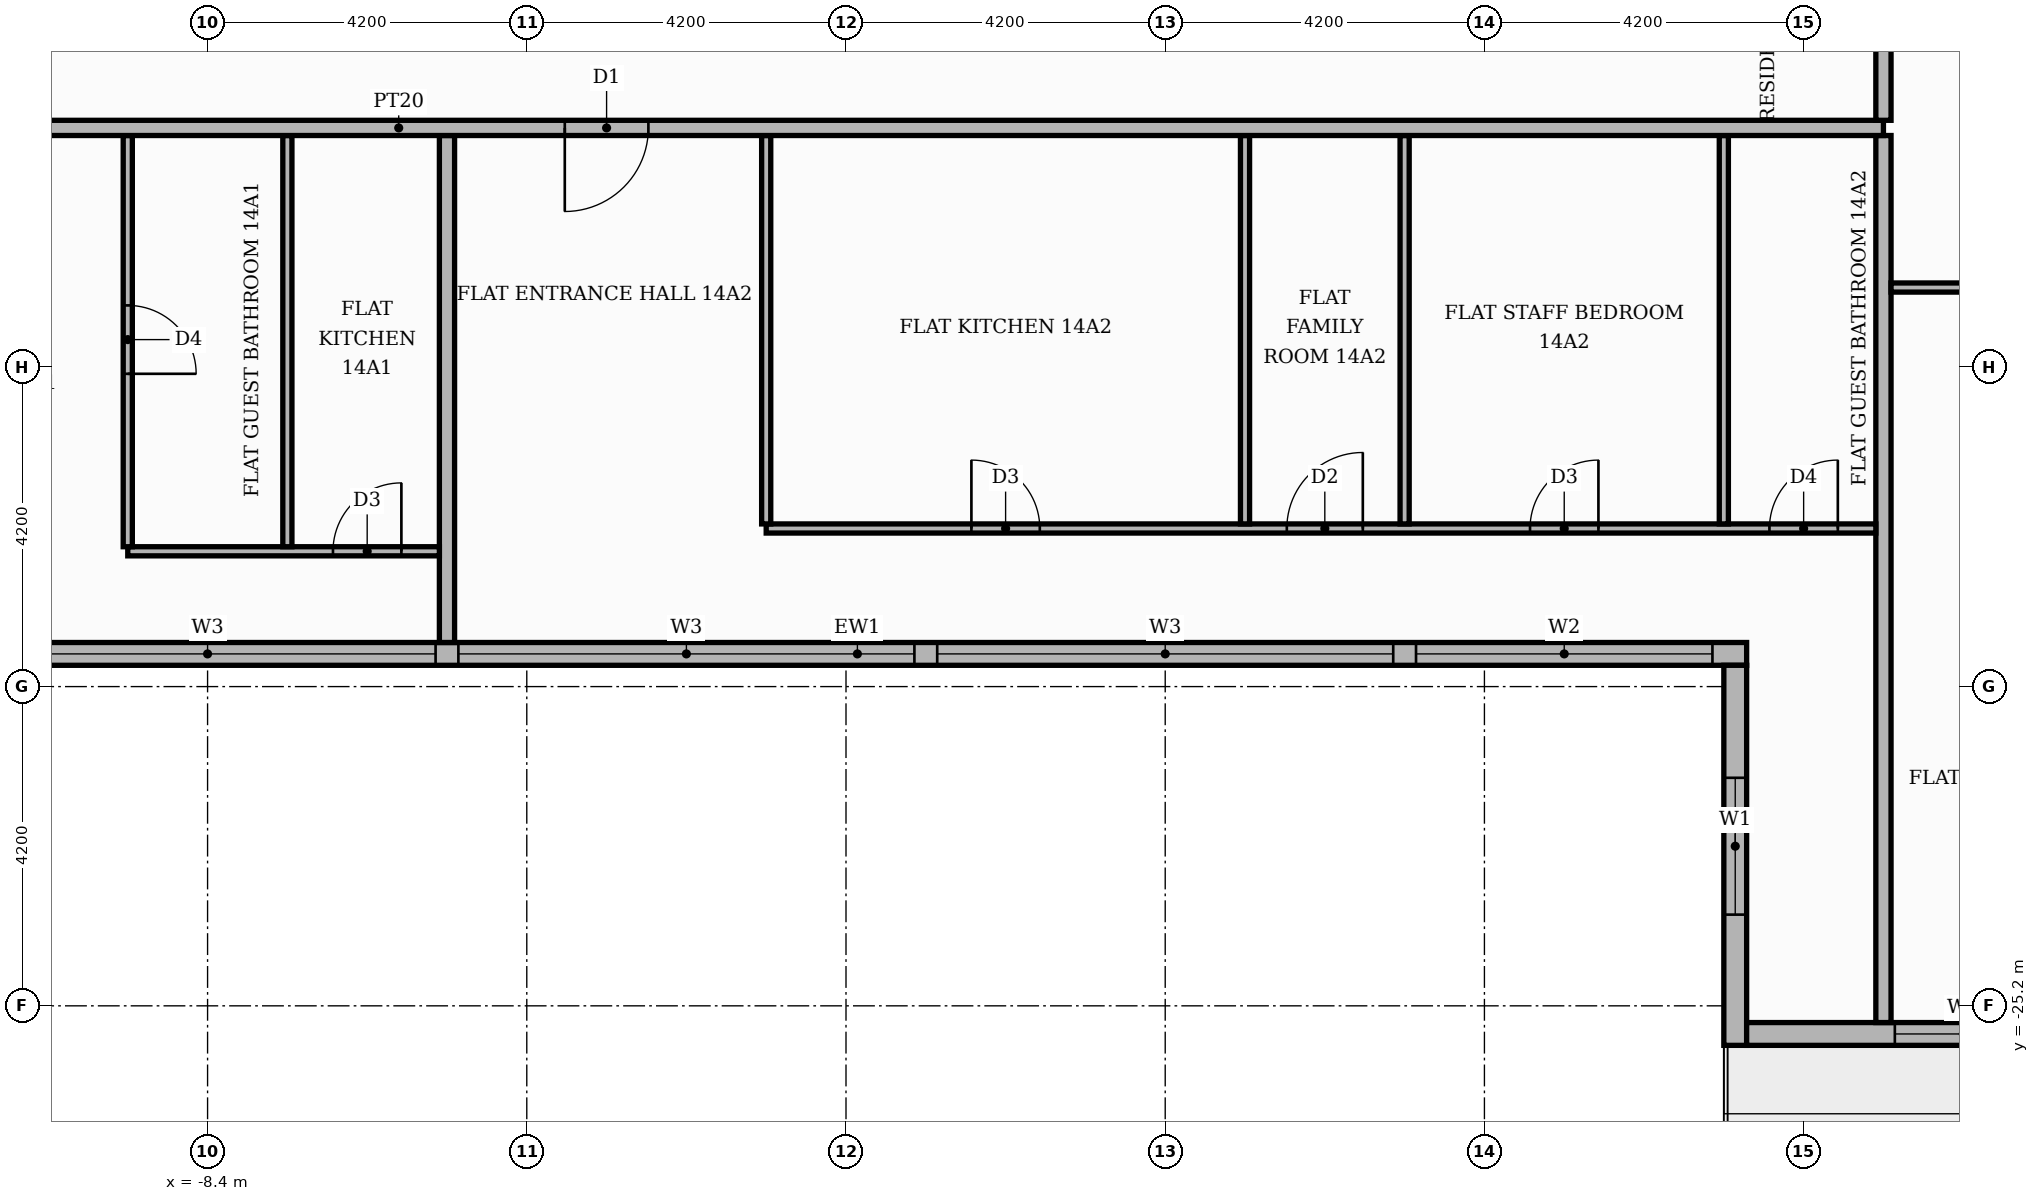
"""IFC4 building model, lengths in metres.
Left out: names, types, materials, properties, quantities, classifications, styles, units other than length and angle.
Written with IfcOpenShell. Run it as: python <this file> out.ifc"""

import sys

from ifc_helpers import new_model, si_unit, direction, frame, frame_2d, origin, place, context, subcontext, project, spatial, rectangle, extrude, element, fill, save


model = new_model("IFC4")
c1 = context("Model", 3, precision=1e-05, world=origin(), true_north=direction((0.0, 1.0)))
c2 = subcontext(c1, "Body", "Model", "MODEL_VIEW")
j1 = project(units=[si_unit("LENGTHUNIT", "METRE"), si_unit("PLANEANGLEUNIT", "RADIAN")], contexts=[c1])
p1 = place(None, origin())
s1 = spatial("IfcSite", under=j1, at=p1, CompositionType="ELEMENT")
p2 = place(p1, origin())
s2 = spatial("IfcBuilding", under=s1, at=p2, CompositionType="ELEMENT")
p3 = place(p2, frame((0.0, 0.0, 62.1)))
s3 = spatial("IfcBuildingStorey", under=s2, at=p3, CompositionType="ELEMENT", Elevation=62.1)
p4 = place(p3, frame((-11.55, -20.57, 0.0), z_axis=(0.0, 0.0, 1.0), x_axis=(1.0, 0.0, 0.0)))
e1 = element("IfcWall", 1, at=p4, inside=s3, PredefinedType="STANDARD", context=c2, shape_type="SweptSolid", body=[
    extrude(rectangle(XDim=23.4, YDim=0.3, at=frame_2d((11.7, 0.0))), origin(), (0.0, 0.0, 1.0), 3.48),
])
p5 = place(p4, frame((0.15, 0.0, 0.9)))
e2 = element("IfcOpeningElement", 2, at=p5, cuts=e1, PredefinedType="OPENING", context=c2, shape_type="SweptSolid", body=[
    extrude(rectangle(XDim=6.0, YDim=2.1, at=frame_2d((3.0, 1.05))), frame((0.0, 0.16, 0.0), z_axis=(0.0, -1.0, 0.0), x_axis=(1.0, 0.0, 0.0)), (0.0, 0.0, 1.0), 0.32),
])
p6 = place(p4, frame((6.45, 0.0, 0.9)))
e3 = element("IfcOpeningElement", 3, at=p6, cuts=e1, PredefinedType="OPENING", context=c2, shape_type="SweptSolid", body=[
    extrude(rectangle(XDim=6.0, YDim=2.1, at=frame_2d((3.0, 1.05))), frame((0.0, 0.16, 0.0), z_axis=(0.0, -1.0, 0.0), x_axis=(1.0, 0.0, 0.0)), (0.0, 0.0, 1.0), 0.32),
])
p7 = place(p4, frame((12.75, 0.0, 0.9)))
e4 = element("IfcOpeningElement", 4, at=p7, cuts=e1, PredefinedType="OPENING", context=c2, shape_type="SweptSolid", body=[
    extrude(rectangle(XDim=6.0, YDim=2.1, at=frame_2d((3.0, 1.05))), frame((0.0, 0.16, 0.0), z_axis=(0.0, -1.0, 0.0), x_axis=(1.0, 0.0, 0.0)), (0.0, 0.0, 1.0), 0.32),
])
p8 = place(p4, frame((19.05, 0.0, 0.9)))
e5 = element("IfcOpeningElement", 5, at=p8, cuts=e1, PredefinedType="OPENING", context=c2, shape_type="SweptSolid", body=[
    extrude(rectangle(XDim=3.9, YDim=2.1, at=frame_2d((1.95, 1.05))), frame((0.0, 0.16, 0.0), z_axis=(0.0, -1.0, 0.0), x_axis=(1.0, 0.0, 0.0)), (0.0, 0.0, 1.0), 0.32),
])
p9 = place(p3, frame((11.7, -20.72, 0.0), z_axis=(0.0, 0.0, 1.0), x_axis=(0.0, -1.0, 0.0)))
e6 = element("IfcWall", 6, at=p9, inside=s3, PredefinedType="STANDARD", context=c2, shape_type="SweptSolid", body=[
    extrude(rectangle(XDim=5.0, YDim=0.3, at=frame_2d((2.5, 0.0))), origin(), (0.0, 0.0, 1.0), 3.48),
])
p10 = place(p9, frame((1.48, 0.0, 0.9)))
e7 = element("IfcOpeningElement", 7, at=p10, cuts=e6, PredefinedType="OPENING", context=c2, shape_type="SweptSolid", body=[
    extrude(rectangle(XDim=1.8, YDim=2.1, at=frame_2d((0.9, 1.05))), frame((0.0, 0.16, 0.0), z_axis=(0.0, -1.0, 0.0), x_axis=(1.0, 0.0, 0.0)), (0.0, 0.0, 1.0), 0.32),
])
p11 = place(p3, frame((11.85, -25.57, 0.0), z_axis=(0.0, 0.0, 1.0), x_axis=(1.0, 0.0, 0.0)))
e8 = element("IfcWall", 8, at=p11, inside=s3, PredefinedType="STANDARD", context=c2, shape_type="SweptSolid", body=[
    extrude(rectangle(XDim=4.35, YDim=0.3, at=frame_2d((2.175, 0.0))), origin(), (0.0, 0.0, 1.0), 3.48),
])
p12 = place(p11, frame((1.95, 0.0, 0.9)))
e9 = element("IfcOpeningElement", 9, at=p12, cuts=e8, PredefinedType="OPENING", context=c2, shape_type="SweptSolid", body=[
    extrude(rectangle(XDim=1.8, YDim=2.1, at=frame_2d((0.9, 1.05))), frame((0.0, 0.16, 0.0), z_axis=(0.0, -1.0, 0.0), x_axis=(1.0, 0.0, 0.0)), (0.0, 0.0, 1.0), 0.32),
])
p13 = place(p3, frame((13.65, -25.42, 0.0), z_axis=(0.0, 0.0, 1.0), x_axis=(0.0, 1.0, 0.0)))
e10 = element("IfcWall", 10, at=p13, inside=s3, PredefinedType="PARTITIONING", context=c2, shape_type="SweptSolid", body=[
    extrude(rectangle(XDim=11.67, YDim=0.2, at=frame_2d((5.835, 0.0))), origin(), (0.0, 0.0, 1.0), 3.48),
])
p14 = place(p3, frame((-5.25, -20.42, 0.0), z_axis=(0.0, 0.0, 1.0), x_axis=(0.0, 1.0, 0.0)))
e11 = element("IfcWall", 11, at=p14, inside=s3, PredefinedType="PARTITIONING", context=c2, shape_type="SweptSolid", body=[
    extrude(rectangle(XDim=6.67, YDim=0.2, at=frame_2d((3.335, 0.0))), origin(), (0.0, 0.0, 1.0), 3.48),
])
p15 = place(p3, frame((-9.45, -19.22, 0.0), z_axis=(0.0, 0.0, 1.0), x_axis=(1.0, 0.0, 0.0)))
e12 = element("IfcWall", 12, at=p15, inside=s3, PredefinedType="PARTITIONING", context=c2, shape_type="SweptSolid", body=[
    extrude(rectangle(XDim=4.1, YDim=0.12, at=frame_2d((2.05, 0.0))), origin(), (0.0, 0.0, 1.0), 3.48),
])
p16 = place(p15, frame((2.7, 0.0, 0.0)))
e13 = element("IfcOpeningElement", 13, at=p16, cuts=e12, PredefinedType="OPENING", context=c2, shape_type="SweptSolid", body=[
    extrude(rectangle(XDim=0.9, YDim=2.1, at=frame_2d((0.45, 1.05))), frame((0.0, 0.07, 0.0), z_axis=(0.0, -1.0, 0.0), x_axis=(1.0, 0.0, 0.0)), (0.0, 0.0, 1.0), 0.14),
])
p17 = place(p3, frame((-9.45, -19.16, 0.0), z_axis=(0.0, 0.0, 1.0), x_axis=(0.0, 1.0, 0.0)))
e14 = element("IfcWall", 14, at=p17, inside=s3, PredefinedType="PARTITIONING", context=c2, shape_type="SweptSolid", body=[
    extrude(rectangle(XDim=5.41, YDim=0.12, at=frame_2d((2.705, 0.0))), origin(), (0.0, 0.0, 1.0), 3.48),
])
p18 = place(p17, frame((2.275, 0.0, 0.0)))
e15 = element("IfcOpeningElement", 15, at=p18, cuts=e14, PredefinedType="OPENING", context=c2, shape_type="SweptSolid", body=[
    extrude(rectangle(XDim=0.9, YDim=2.1, at=frame_2d((0.45, 1.05))), frame((0.0, 0.07, 0.0), z_axis=(0.0, -1.0, 0.0), x_axis=(1.0, 0.0, 0.0)), (0.0, 0.0, 1.0), 0.14),
])
p19 = place(p3, frame((-7.35, -19.16, 0.0), z_axis=(0.0, 0.0, 1.0), x_axis=(0.0, 1.0, 0.0)))
e16 = element("IfcWall", 16, at=p19, inside=s3, PredefinedType="PARTITIONING", context=c2, shape_type="SweptSolid", body=[
    extrude(rectangle(XDim=5.41, YDim=0.12, at=frame_2d((2.705, 0.0))), origin(), (0.0, 0.0, 1.0), 3.48),
])
p20 = place(p3, frame((-1.05, -18.92, 0.0), z_axis=(0.0, 0.0, 1.0), x_axis=(1.0, 0.0, 0.0)))
e17 = element("IfcWall", 17, at=p20, inside=s3, PredefinedType="PARTITIONING", context=c2, shape_type="SweptSolid", body=[
    extrude(rectangle(XDim=14.6, YDim=0.12, at=frame_2d((7.3, 0.0))), origin(), (0.0, 0.0, 1.0), 3.48),
])
p21 = place(p20, frame((2.7, 0.0, 0.0)))
e18 = element("IfcOpeningElement", 18, at=p21, cuts=e17, PredefinedType="OPENING", context=c2, shape_type="SweptSolid", body=[
    extrude(rectangle(XDim=0.9, YDim=2.1, at=frame_2d((0.45, 1.05))), frame((0.0, 0.07, 0.0), z_axis=(0.0, -1.0, 0.0), x_axis=(1.0, 0.0, 0.0)), (0.0, 0.0, 1.0), 0.14),
])
p22 = place(p20, frame((6.85, 0.0, 0.0)))
e19 = element("IfcOpeningElement", 19, at=p22, cuts=e17, PredefinedType="OPENING", context=c2, shape_type="SweptSolid", body=[
    extrude(rectangle(XDim=1.0, YDim=2.1, at=frame_2d((0.5, 1.05))), frame((0.0, 0.07, 0.0), z_axis=(0.0, -1.0, 0.0), x_axis=(1.0, 0.0, 0.0)), (0.0, 0.0, 1.0), 0.14),
])
p23 = place(p20, frame((10.05, 0.0, 0.0)))
e20 = element("IfcOpeningElement", 20, at=p23, cuts=e17, PredefinedType="OPENING", context=c2, shape_type="SweptSolid", body=[
    extrude(rectangle(XDim=0.9, YDim=2.1, at=frame_2d((0.45, 1.05))), frame((0.0, 0.07, 0.0), z_axis=(0.0, -1.0, 0.0), x_axis=(1.0, 0.0, 0.0)), (0.0, 0.0, 1.0), 0.14),
])
p24 = place(p20, frame((13.2, 0.0, 0.0)))
e21 = element("IfcOpeningElement", 21, at=p24, cuts=e17, PredefinedType="OPENING", context=c2, shape_type="SweptSolid", body=[
    extrude(rectangle(XDim=0.9, YDim=2.1, at=frame_2d((0.45, 1.05))), frame((0.0, 0.07, 0.0), z_axis=(0.0, -1.0, 0.0), x_axis=(1.0, 0.0, 0.0)), (0.0, 0.0, 1.0), 0.14),
])
for number, where, z_axis, x_axis in (
    (22, (-1.05, -18.86, 0.0), (0.0, 0.0, 1.0), (0.0, 1.0, 0.0)),
    (23, (5.25, -18.86, 0.0), (0.0, 0.0, 1.0), (0.0, 1.0, 0.0)),
    (24, (7.35, -18.86, 0.0), (0.0, 0.0, 1.0), (0.0, 1.0, 0.0)),
    (25, (11.55, -18.86, 0.0), (0.0, 0.0, 1.0), (0.0, 1.0, 0.0)),
):
    element("IfcWall", number, at=place(p3, frame(where, z_axis=z_axis, x_axis=x_axis)), inside=s3, PredefinedType="PARTITIONING", context=c2, shape_type="SweptSolid", body=[
        extrude(rectangle(XDim=5.11, YDim=0.12, at=frame_2d((2.555, 0.0))), origin(), (0.0, 0.0, 1.0), 3.48),
    ])
p25 = place(p3, frame((13.75, -15.75, 0.0), z_axis=(0.0, 0.0, 1.0), x_axis=(1.0, 0.0, 0.0)))
e26 = element("IfcWall", 26, at=p25, inside=s3, PredefinedType="PARTITIONING", context=c2, shape_type="SweptSolid", body=[
    extrude(rectangle(XDim=6.07, YDim=0.12, at=frame_2d((3.035, 0.0))), origin(), (0.0, 0.0, 1.0), 3.48),
])
p26 = place(p25, frame((2.485, 0.0, 0.0)))
e27 = element("IfcOpeningElement", 27, at=p26, cuts=e26, PredefinedType="OPENING", context=c2, shape_type="SweptSolid", body=[
    extrude(rectangle(XDim=1.0, YDim=2.1, at=frame_2d((0.5, 1.05))), frame((0.0, 0.07, 0.0), z_axis=(0.0, -1.0, 0.0), x_axis=(1.0, 0.0, 0.0)), (0.0, 0.0, 1.0), 0.14),
])
p27 = place(p3, frame((-25.42, -13.65, 0.0), z_axis=(0.0, 0.0, 1.0), x_axis=(1.0, 0.0, 0.0)))
e28 = element("IfcWall", 28, at=p27, inside=s3, PredefinedType="PARTITIONING", context=c2, shape_type="SweptSolid", body=[
    extrude(rectangle(XDim=39.07, YDim=0.2, at=frame_2d((19.535, 0.0))), origin(), (0.0, 0.0, 1.0), 3.48),
])
p28 = place(p27, frame((13.32, 0.0, 0.0)))
e29 = element("IfcOpeningElement", 29, at=p28, cuts=e28, PredefinedType="OPENING", context=c2, shape_type="SweptSolid", body=[
    extrude(rectangle(XDim=1.1, YDim=2.4, at=frame_2d((0.55, 1.2))), frame((0.0, 0.11, 0.0), z_axis=(0.0, -1.0, 0.0), x_axis=(1.0, 0.0, 0.0)), (0.0, 0.0, 1.0), 0.22),
])
p29 = place(p27, frame((21.72, 0.0, 0.0)))
e30 = element("IfcOpeningElement", 30, at=p29, cuts=e28, PredefinedType="OPENING", context=c2, shape_type="SweptSolid", body=[
    extrude(rectangle(XDim=1.1, YDim=2.4, at=frame_2d((0.55, 1.2))), frame((0.0, 0.11, 0.0), z_axis=(0.0, -1.0, 0.0), x_axis=(1.0, 0.0, 0.0)), (0.0, 0.0, 1.0), 0.22),
])
p30 = place(p3, frame((13.65, -13.55, 0.0), z_axis=(0.0, 0.0, 1.0), x_axis=(0.0, 1.0, 0.0)))
e31 = element("IfcWall", 31, at=p30, inside=s3, PredefinedType="PARTITIONING", context=c2, shape_type="SweptSolid", body=[
    extrude(rectangle(XDim=8.2, YDim=0.2, at=frame_2d((4.1, 0.0))), origin(), (0.0, 0.0, 1.0), 3.48),
])
p31 = place(p30, frame((1.45, 0.0, 0.0)))
e32 = element("IfcOpeningElement", 32, at=p31, cuts=e31, PredefinedType="OPENING", context=c2, shape_type="SweptSolid", body=[
    extrude(rectangle(XDim=1.1, YDim=2.4, at=frame_2d((0.55, 1.2))), frame((0.0, 0.11, 0.0), z_axis=(0.0, -1.0, 0.0), x_axis=(1.0, 0.0, 0.0)), (0.0, 0.0, 1.0), 0.22),
])
p32 = place(p5, origin())
e33 = element("IfcWindow", 33, at=p32, inside=s3, PartitioningType="SINGLE_PANEL", PredefinedType="WINDOW", context=c2, shape_type="SweptSolid", body=[
    extrude(rectangle(XDim=6.0, YDim=2.1, at=frame_2d((3.0, 1.05))), frame((0.0, 0.03, 0.0), z_axis=(0.0, -1.0, 0.0), x_axis=(1.0, 0.0, 0.0)), (0.0, 0.0, 1.0), 0.06),
])
fill(e2, e33)
p33 = place(p6, origin())
e34 = element("IfcWindow", 34, at=p33, inside=s3, PartitioningType="SINGLE_PANEL", PredefinedType="WINDOW", context=c2, shape_type="SweptSolid", body=[
    extrude(rectangle(XDim=6.0, YDim=2.1, at=frame_2d((3.0, 1.05))), frame((0.0, 0.03, 0.0), z_axis=(0.0, -1.0, 0.0), x_axis=(1.0, 0.0, 0.0)), (0.0, 0.0, 1.0), 0.06),
])
fill(e3, e34)
p34 = place(p7, origin())
e35 = element("IfcWindow", 35, at=p34, inside=s3, PartitioningType="SINGLE_PANEL", PredefinedType="WINDOW", context=c2, shape_type="SweptSolid", body=[
    extrude(rectangle(XDim=6.0, YDim=2.1, at=frame_2d((3.0, 1.05))), frame((0.0, 0.03, 0.0), z_axis=(0.0, -1.0, 0.0), x_axis=(1.0, 0.0, 0.0)), (0.0, 0.0, 1.0), 0.06),
])
fill(e4, e35)
p35 = place(p8, origin())
e36 = element("IfcWindow", 36, at=p35, inside=s3, PartitioningType="SINGLE_PANEL", PredefinedType="WINDOW", context=c2, shape_type="SweptSolid", body=[
    extrude(rectangle(XDim=3.9, YDim=2.1, at=frame_2d((1.95, 1.05))), frame((0.0, 0.03, 0.0), z_axis=(0.0, -1.0, 0.0), x_axis=(1.0, 0.0, 0.0)), (0.0, 0.0, 1.0), 0.06),
])
fill(e5, e36)
p36 = place(p10, origin())
e37 = element("IfcWindow", 37, at=p36, inside=s3, PartitioningType="SINGLE_PANEL", PredefinedType="WINDOW", context=c2, shape_type="SweptSolid", body=[
    extrude(rectangle(XDim=1.8, YDim=2.1, at=frame_2d((0.9, 1.05))), frame((0.0, 0.03, 0.0), z_axis=(0.0, -1.0, 0.0), x_axis=(1.0, 0.0, 0.0)), (0.0, 0.0, 1.0), 0.06),
])
fill(e7, e37)
p37 = place(p12, origin())
e38 = element("IfcWindow", 38, at=p37, inside=s3, PartitioningType="SINGLE_PANEL", PredefinedType="WINDOW", context=c2, shape_type="SweptSolid", body=[
    extrude(rectangle(XDim=1.8, YDim=2.1, at=frame_2d((0.9, 1.05))), frame((0.0, 0.03, 0.0), z_axis=(0.0, -1.0, 0.0), x_axis=(1.0, 0.0, 0.0)), (0.0, 0.0, 1.0), 0.06),
])
fill(e9, e38)
p38 = place(p18, frame((0.9, 0.0, 0.0), z_axis=(0.0, 0.0, 1.0), x_axis=(-1.0, 0.0, 0.0)))
e39 = element("IfcDoor", 39, at=p38, inside=s3, OperationType="SINGLE_SWING_LEFT", PredefinedType="DOOR", context=c2, shape_type="SweptSolid", body=[
    extrude(rectangle(XDim=0.9, YDim=2.1, at=frame_2d((0.45, 1.05))), frame((0.0, 0.025, 0.0), z_axis=(0.0, -1.0, 0.0), x_axis=(1.0, 0.0, 0.0)), (0.0, 0.0, 1.0), 0.05),
])
fill(e15, e39)
p39 = place(p16, origin())
e40 = element("IfcDoor", 40, at=p39, inside=s3, OperationType="SINGLE_SWING_RIGHT", PredefinedType="DOOR", context=c2, shape_type="SweptSolid", body=[
    extrude(rectangle(XDim=0.9, YDim=2.1, at=frame_2d((0.45, 1.05))), frame((0.0, 0.025, 0.0), z_axis=(0.0, -1.0, 0.0), x_axis=(1.0, 0.0, 0.0)), (0.0, 0.0, 1.0), 0.05),
])
fill(e13, e40)
p40 = place(p29, frame((1.1, 0.0, 0.0), z_axis=(0.0, 0.0, 1.0), x_axis=(-1.0, 0.0, 0.0)))
e41 = element("IfcDoor", 41, at=p40, inside=s3, OperationType="SINGLE_SWING_LEFT", PredefinedType="DOOR", context=c2, shape_type="SweptSolid", body=[
    extrude(rectangle(XDim=1.1, YDim=2.4, at=frame_2d((0.55, 1.2))), frame((0.0, 0.025, 0.0), z_axis=(0.0, -1.0, 0.0), x_axis=(1.0, 0.0, 0.0)), (0.0, 0.0, 1.0), 0.05),
])
fill(e30, e41)
p41 = place(p21, origin())
e42 = element("IfcDoor", 42, at=p41, inside=s3, OperationType="SINGLE_SWING_LEFT", PredefinedType="DOOR", context=c2, shape_type="SweptSolid", body=[
    extrude(rectangle(XDim=0.9, YDim=2.1, at=frame_2d((0.45, 1.05))), frame((0.0, 0.025, 0.0), z_axis=(0.0, -1.0, 0.0), x_axis=(1.0, 0.0, 0.0)), (0.0, 0.0, 1.0), 0.05),
])
fill(e18, e42)
p42 = place(p22, origin())
e43 = element("IfcDoor", 43, at=p42, inside=s3, OperationType="SINGLE_SWING_RIGHT", PredefinedType="DOOR", context=c2, shape_type="SweptSolid", body=[
    extrude(rectangle(XDim=1.0, YDim=2.1, at=frame_2d((0.5, 1.05))), frame((0.0, 0.025, 0.0), z_axis=(0.0, -1.0, 0.0), x_axis=(1.0, 0.0, 0.0)), (0.0, 0.0, 1.0), 0.05),
])
fill(e19, e43)
p43 = place(p23, origin())
e44 = element("IfcDoor", 44, at=p43, inside=s3, OperationType="SINGLE_SWING_RIGHT", PredefinedType="DOOR", context=c2, shape_type="SweptSolid", body=[
    extrude(rectangle(XDim=0.9, YDim=2.1, at=frame_2d((0.45, 1.05))), frame((0.0, 0.025, 0.0), z_axis=(0.0, -1.0, 0.0), x_axis=(1.0, 0.0, 0.0)), (0.0, 0.0, 1.0), 0.05),
])
fill(e20, e44)
p44 = place(p24, origin())
e45 = element("IfcDoor", 45, at=p44, inside=s3, OperationType="SINGLE_SWING_RIGHT", PredefinedType="DOOR", context=c2, shape_type="SweptSolid", body=[
    extrude(rectangle(XDim=0.9, YDim=2.1, at=frame_2d((0.45, 1.05))), frame((0.0, 0.025, 0.0), z_axis=(0.0, -1.0, 0.0), x_axis=(1.0, 0.0, 0.0)), (0.0, 0.0, 1.0), 0.05),
])
fill(e21, e45)
save(model, sys.argv[1])
